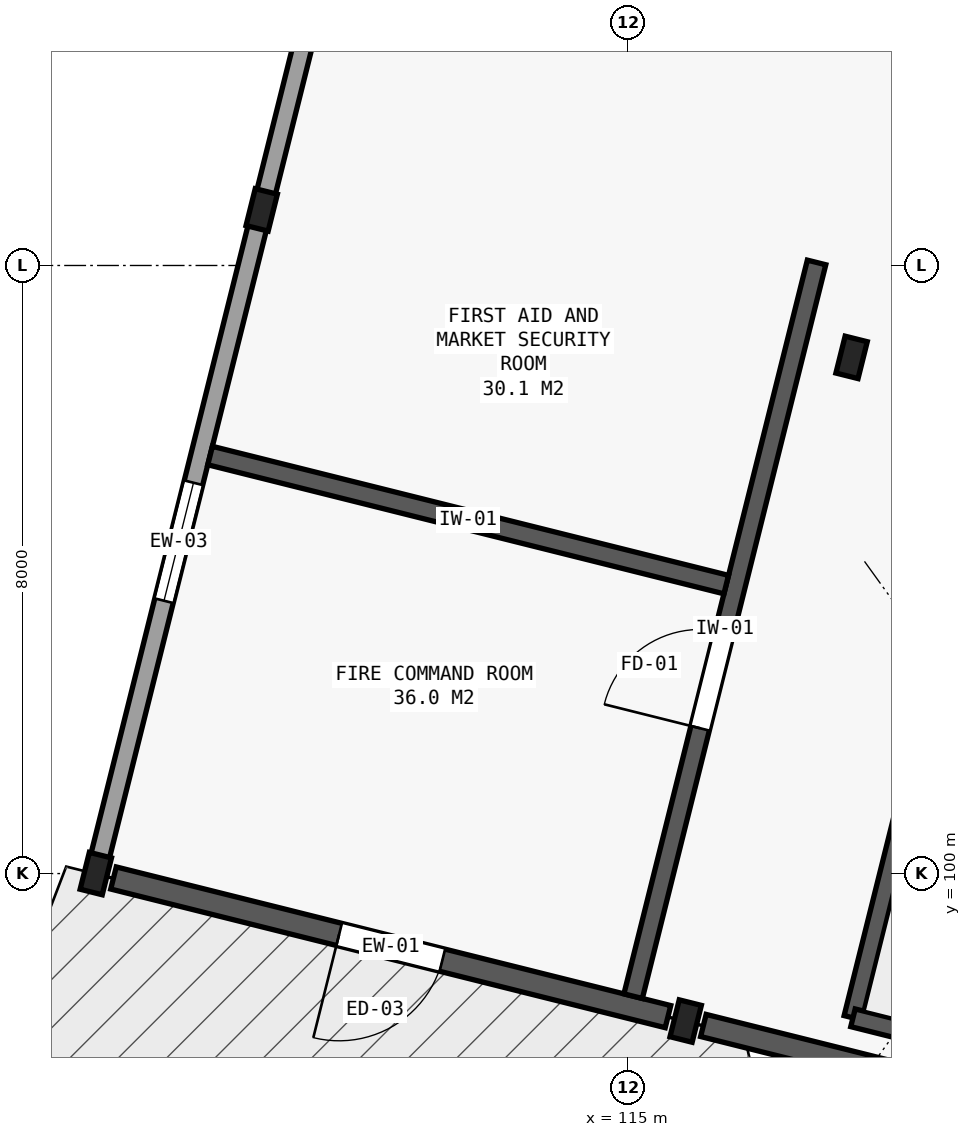
"""IFC4 building model, lengths in metres.
Left out: names, types, materials, properties, quantities, classifications, styles, units other than length and angle.
Written with IfcOpenShell. Run it as: python <this file> out.ifc"""

import sys

from ifc_helpers import new_model, si_unit, direction, frame, frame_2d, origin, origin_2d, place, context, subcontext, project, spatial, rectangle, i_section, extrude, element, fill, save


model = new_model("IFC4")
c1 = context("Model", 3, precision=1e-05, world=origin(), true_north=direction((0.0, 1.0)))
c2 = subcontext(c1, "Body", "Model", "MODEL_VIEW")
j1 = project(units=[si_unit("LENGTHUNIT", "METRE"), si_unit("PLANEANGLEUNIT", "RADIAN")], contexts=[c1])
p1 = place(None, origin())
s1 = spatial("IfcSite", under=j1, at=p1, CompositionType="ELEMENT")
p2 = place(p1, origin())
s2 = spatial("IfcBuilding", under=s1, at=p2, CompositionType="ELEMENT")
p3 = place(p2, origin())
s3 = spatial("IfcBuildingStorey", under=s2, at=p3, CompositionType="ELEMENT", Elevation=0.0)
for number, where, z_axis, x_axis in (
    (1, (108.0, 100.0, 0.0), (0.0, 0.0, 1.0), (0.97, -0.243, 0.0)),
    (2, (110.183, 108.731, 0.0), (0.0, 0.0, 1.0), (0.97, -0.243, 0.0)),
    (3, (115.761, 98.06, 0.0), (0.0, 0.0, 1.0), (0.97, -0.243, 0.0)),
    (4, (117.944, 106.791, 0.0), (0.0, 0.0, 1.0), (0.97, -0.243, 0.0)),
):
    element("IfcColumn", number, at=place(p3, frame(where, z_axis=z_axis, x_axis=x_axis)), inside=s3, PredefinedType="COLUMN", context=c2, shape_type="SweptSolid", body=[
        extrude(i_section(OverallWidth=0.3, OverallDepth=0.5, WebThickness=0.014, FlangeThickness=0.028, FilletRadius=0.027, at=origin_2d()), origin(), (0.0, 0.0, 1.0), 5.4),
    ])
p4 = place(p3, frame((115.528, 98.118, 0.0), z_axis=(0.0, 0.0, 1.0), x_axis=(-0.970138680536, 0.242550902961, 0.0)))
e5 = element("IfcWall", 5, at=p4, inside=s3, PredefinedType="SHEAR", context=c2, shape_type="SweptSolid", body=[
    extrude(rectangle(XDim=7.52, YDim=0.3, at=frame_2d((3.76, 0.0))), origin(), (0.0, 0.0, 1.0), 5.1),
])
p5 = place(p4, frame((3.06, 0.0, 0.0)))
e6 = element("IfcOpeningElement", 6, at=p5, cuts=e5, PredefinedType="OPENING", context=c2, shape_type="SweptSolid", body=[
    extrude(rectangle(XDim=1.4, YDim=2.2, at=frame_2d((0.7, 1.1))), frame((0.0, 0.16, 0.0), z_axis=(0.0, -1.0, 0.0), x_axis=(1.0, 0.0, 0.0)), (0.0, 0.0, 1.0), 0.32),
])
p6 = place(p3, frame((123.29, 96.178, 0.0), z_axis=(0.0, 0.0, 1.0), x_axis=(-0.970148228972, 0.242512708578, 0.0)))
e7 = element("IfcWall", 7, at=p6, inside=s3, PredefinedType="SHEAR", context=c2, shape_type="SweptSolid", body=[
    extrude(rectangle(XDim=7.52, YDim=0.3, at=frame_2d((3.76, 0.0))), origin(), (0.0, 0.0, 1.0), 5.1),
])
p7 = place(p6, frame((2.51, 0.0, 1.05)))
e8 = element("IfcOpeningElement", 8, at=p7, cuts=e7, PredefinedType="OPENING", context=c2, shape_type="SweptSolid", body=[
    extrude(rectangle(XDim=2.5, YDim=1.65, at=frame_2d((1.25, 0.825))), frame((0.0, 0.16, 0.0), z_axis=(0.0, -1.0, 0.0), x_axis=(1.0, 0.0, 0.0)), (0.0, 0.0, 1.0), 0.32),
])
p8 = place(p3, frame((108.058, 100.233, 0.0), z_axis=(0.0, 0.0, 1.0), x_axis=(0.242535625036, 0.970142500145, 0.0)))
e9 = element("IfcWall", 9, at=p8, inside=s3, PredefinedType="SOLIDWALL", context=c2, shape_type="SweptSolid", body=[
    extrude(rectangle(XDim=8.52, YDim=0.25, at=frame_2d((4.26, 0.0))), origin(), (0.0, 0.0, 1.0), 4.685),
])
p9 = place(p8, frame((3.46, 0.0, 1.05)))
e10 = element("IfcOpeningElement", 10, at=p9, cuts=e9, PredefinedType="OPENING", context=c2, shape_type="SweptSolid", body=[
    extrude(rectangle(XDim=1.6, YDim=1.3, at=frame_2d((0.8, 0.65))), frame((0.0, 0.135, 0.0), z_axis=(0.0, -1.0, 0.0), x_axis=(1.0, 0.0, 0.0)), (0.0, 0.0, 1.0), 0.27),
])
p10 = place(p3, frame((110.241, 108.964, 0.0), z_axis=(0.0, 0.0, 1.0), x_axis=(0.242535625036, 0.970142500145, 0.0)))
e11 = element("IfcWall", 11, at=p10, inside=s3, PredefinedType="SOLIDWALL", context=c2, shape_type="SweptSolid", body=[
    extrude(rectangle(XDim=8.52, YDim=0.25, at=frame_2d((4.26, 0.0))), origin(), (0.0, 0.0, 1.0), 4.685),
])
p11 = place(p10, frame((3.26, 0.0, 0.0)))
e12 = element("IfcOpeningElement", 12, at=p11, cuts=e11, PredefinedType="OPENING", context=c2, shape_type="SweptSolid", body=[
    extrude(rectangle(XDim=2.0, YDim=2.3, at=frame_2d((1.0, 1.15))), frame((0.0, 0.135, 0.0), z_axis=(0.0, -1.0, 0.0), x_axis=(1.0, 0.0, 0.0)), (0.0, 0.0, 1.0), 0.27),
])
p12 = place(p3, frame((117.962, 98.102, 0.0), z_axis=(0.0, 0.0, 1.0), x_axis=(0.242528444268, 0.970144295309, 0.0)))
e13 = element("IfcWall", 13, at=p12, inside=s3, PredefinedType="SOLIDWALL", context=c2, shape_type="SweptSolid", body=[
    extrude(rectangle(XDim=8.0, YDim=0.24, at=frame_2d((4.0, 0.0))), origin(), (0.0, 0.0, 1.0), 5.135),
])
p13 = place(p3, frame((121.6, 97.193, 0.0), z_axis=(0.0, 0.0, 1.0), x_axis=(-0.970131009923, 0.242581581301, 0.0)))
e14 = element("IfcWall", 14, at=p13, inside=s3, PredefinedType="SOLIDWALL", context=c2, shape_type="SweptSolid", body=[
    extrude(rectangle(XDim=3.75, YDim=0.24, at=frame_2d((1.875, 0.0))), origin(), (0.0, 0.0, 1.0), 5.135),
])
p14 = place(p3, frame((115.07, 98.387, 0.0), z_axis=(0.0, 0.0, 1.0), x_axis=(0.242547171792, 0.970139613384, 0.0)))
e15 = element("IfcWall", 15, at=p14, inside=s3, PredefinedType="SOLIDWALL", context=c2, shape_type="SweptSolid", body=[
    extrude(rectangle(XDim=9.95, YDim=0.25, at=frame_2d((4.975, 0.0))), origin(), (0.0, 0.0, 1.0), 5.08),
])
p15 = place(p14, frame((3.633, 0.0, 0.0)))
e16 = element("IfcOpeningElement", 16, at=p15, cuts=e15, PredefinedType="OPENING", context=c2, shape_type="SweptSolid", body=[
    extrude(rectangle(XDim=1.3, YDim=2.15, at=frame_2d((0.65, 1.075))), frame((0.0, 0.135, 0.0), z_axis=(0.0, -1.0, 0.0), x_axis=(1.0, 0.0, 0.0)), (0.0, 0.0, 1.0), 0.27),
])
p16 = place(p3, frame((109.504, 105.5, 0.0), z_axis=(0.0, 0.0, 1.0), x_axis=(0.970142500145, -0.242535625036, 0.0)))
e17 = element("IfcWall", 17, at=p16, inside=s3, PredefinedType="SOLIDWALL", context=c2, shape_type="SweptSolid", body=[
    extrude(rectangle(XDim=7.0, YDim=0.25, at=frame_2d((3.5, 0.0))), origin(), (0.0, 0.0, 1.0), 5.08),
])
p17 = place(p5, origin())
e18 = element("IfcDoor", 18, at=p17, inside=s3, OperationType="SINGLE_SWING_RIGHT", PredefinedType="DOOR", context=c2, shape_type="SweptSolid", body=[
    extrude(rectangle(XDim=1.4, YDim=2.2, at=frame_2d((0.7, 1.1))), frame((0.0, 0.025, 0.0), z_axis=(0.0, -1.0, 0.0), x_axis=(1.0, 0.0, 0.0)), (0.0, 0.0, 1.0), 0.05),
])
fill(e6, e18)
p18 = place(p9, origin())
e19 = element("IfcWindow", 19, at=p18, inside=s3, PartitioningType="SINGLE_PANEL", PredefinedType="WINDOW", context=c2, shape_type="SweptSolid", body=[
    extrude(rectangle(XDim=1.6, YDim=1.3, at=frame_2d((0.8, 0.65))), frame((0.0, 0.03, 0.0), z_axis=(0.0, -1.0, 0.0), x_axis=(1.0, 0.0, 0.0)), (0.0, 0.0, 1.0), 0.06),
])
fill(e10, e19)
p19 = place(p15, origin())
e20 = element("IfcDoor", 20, at=p19, inside=s3, OperationType="SINGLE_SWING_LEFT", PredefinedType="DOOR", context=c2, shape_type="SweptSolid", body=[
    extrude(rectangle(XDim=1.3, YDim=2.15, at=frame_2d((0.65, 1.075))), frame((0.0, 0.025, 0.0), z_axis=(0.0, -1.0, 0.0), x_axis=(1.0, 0.0, 0.0)), (0.0, 0.0, 1.0), 0.05),
])
fill(e16, e20)
save(model, sys.argv[1])
